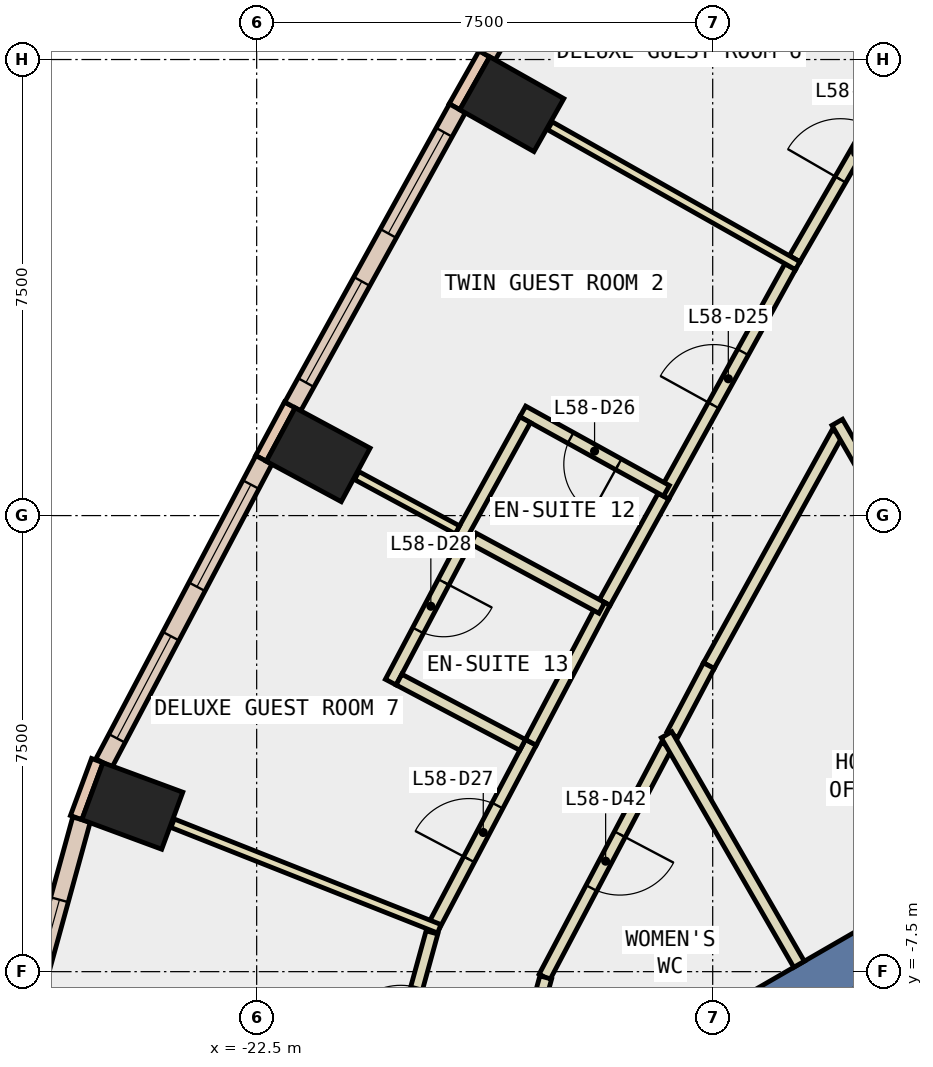
"""IFC4 building model, lengths in metres.
Left out: names, types, materials, properties, quantities, classifications, styles, units other than length and angle.
Written with IfcOpenShell. Run it as: python <this file> out.ifc"""

import sys

from ifc_helpers import new_model, si_unit, direction, frame, frame_2d, origin, origin_2d, place, context, subcontext, project, spatial, rectangle, extrude, element, fill, save


model = new_model("IFC4")
c1 = context("Model", 3, precision=1e-05, world=origin(), true_north=direction((0.0, 1.0)))
c2 = subcontext(c1, "Body", "Model", "MODEL_VIEW")
j1 = project(units=[si_unit("LENGTHUNIT", "METRE"), si_unit("PLANEANGLEUNIT", "RADIAN")], contexts=[c1])
p1 = place(None, origin())
s1 = spatial("IfcSite", under=j1, at=p1, CompositionType="ELEMENT")
p2 = place(p1, origin())
s2 = spatial("IfcBuilding", under=s1, at=p2, CompositionType="ELEMENT")
p3 = place(p2, frame((0.0, 0.0, 255.8)))
s3 = spatial("IfcBuildingStorey", under=s2, at=p3, CompositionType="ELEMENT", Elevation=255.8)
for number, where, z_axis, x_axis in (
    (1, (-18.304, 6.766, -0.34), (0.0, 0.0, 1.0), (0.491, 0.871, 0.0)),
    (2, (-21.488, 1.001, -0.34), (0.0, 0.0, 1.0), (0.474, 0.881, 0.0)),
    (3, (-24.545, -4.775, -0.34), (0.0, 0.0, 1.0), (0.347, 0.938, 0.0)),
):
    element("IfcColumn", number, at=place(p3, frame(where, z_axis=z_axis, x_axis=x_axis)), inside=s3, PredefinedType="COLUMN", context=c2, shape_type="SweptSolid", body=[
        extrude(rectangle(XDim=1.0, YDim=1.4, at=origin_2d()), origin(), (0.0, 0.0, 1.0), 3.6),
    ])
p4 = place(p3, frame((-7.578, -4.375, -0.34), z_axis=(0.0, 0.0, 1.0), x_axis=(-0.866024315419, -0.5000018851, 0.0)))
e4 = element("IfcWall", 4, at=p4, inside=s3, PredefinedType="SHEAR", context=c2, shape_type="SweptSolid", body=[
    extrude(rectangle(XDim=9.0, YDim=0.8, at=frame_2d((4.5, 0.0))), origin(), (0.0, 0.0, 1.0), 3.6),
])
for number, where, z_axis, x_axis in (
    (5, (-18.755, 7.594, 0.0), (0.0, 0.0, 1.0), (-0.492, -0.871, 0.0)),
    (6, (-21.955, 1.821, 0.0), (0.0, 0.0, 1.0), (-0.474, -0.881, 0.0)),
):
    element("IfcWall", number, at=place(p3, frame(where, z_axis=z_axis, x_axis=x_axis)), inside=s3, PredefinedType="STANDARD", context=c2, shape_type="SweptSolid", body=[
        extrude(rectangle(XDim=1.0, YDim=0.2, at=frame_2d((0.5, 0.0))), origin(), (0.0, 0.0, 1.0), 3.26),
    ])
p5 = place(p3, frame((-25.122, -4.029, 0.0), z_axis=(0.0, 0.0, 1.0), x_axis=(-0.346892928577, -0.937904737222, 0.0)))
e7 = element("IfcWall", 7, at=p5, inside=s3, PredefinedType="STANDARD", context=c2, shape_type="SweptSolid", body=[
    extrude(rectangle(XDim=1.0, YDim=0.2, at=frame_2d((0.5, 0.0))), origin(), (0.0, 0.0, 1.0), 3.26),
])
p6 = place(p3, frame((-15.906, 12.418, 0.0), z_axis=(0.0, 0.0, 1.0), x_axis=(-0.500089564757, -0.865973687372, 0.0)))
e8 = element("IfcWall", 8, at=p6, inside=s3, PredefinedType="STANDARD", context=c2, shape_type="SweptSolid", body=[
    extrude(rectangle(XDim=5.603, YDim=0.3, at=frame_2d((2.802, 0.0))), origin(), (0.0, 0.0, 1.0), 3.26),
])
p7 = place(p6, frame((0.451, 0.0, 0.9)))
e9 = element("IfcOpeningElement", 9, at=p7, cuts=e8, PredefinedType="OPENING", context=c2, shape_type="SweptSolid", body=[
    extrude(rectangle(XDim=1.9, YDim=2.0, at=frame_2d((0.95, 1.0))), frame((0.0, 0.16, 0.0), z_axis=(0.0, -1.0, 0.0), x_axis=(1.0, 0.0, 0.0)), (0.0, 0.0, 1.0), 0.32),
])
p8 = place(p6, frame((3.252, 0.0, 0.9)))
e10 = element("IfcOpeningElement", 10, at=p8, cuts=e8, PredefinedType="OPENING", context=c2, shape_type="SweptSolid", body=[
    extrude(rectangle(XDim=1.9, YDim=2.0, at=frame_2d((0.95, 1.0))), frame((0.0, 0.16, 0.0), z_axis=(0.0, -1.0, 0.0), x_axis=(1.0, 0.0, 0.0)), (0.0, 0.0, 1.0), 0.32),
])
p9 = place(p3, frame((-19.199, 6.697, 0.0), z_axis=(0.0, 0.0, 1.0), x_axis=(-0.483469062695, -0.875361448441, 0.0)))
e11 = element("IfcWall", 11, at=p9, inside=s3, PredefinedType="STANDARD", context=c2, shape_type="SweptSolid", body=[
    extrude(rectangle(XDim=5.601, YDim=0.3, at=frame_2d((2.801, 0.0))), origin(), (0.0, 0.0, 1.0), 3.26),
])
p10 = place(p9, frame((0.45, 0.0, 0.9)))
e12 = element("IfcOpeningElement", 12, at=p10, cuts=e11, PredefinedType="OPENING", context=c2, shape_type="SweptSolid", body=[
    extrude(rectangle(XDim=1.9, YDim=2.0, at=frame_2d((0.95, 1.0))), frame((0.0, 0.16, 0.0), z_axis=(0.0, -1.0, 0.0), x_axis=(1.0, 0.0, 0.0)), (0.0, 0.0, 1.0), 0.32),
])
p11 = place(p9, frame((3.251, 0.0, 0.9)))
e13 = element("IfcOpeningElement", 13, at=p11, cuts=e11, PredefinedType="OPENING", context=c2, shape_type="SweptSolid", body=[
    extrude(rectangle(XDim=1.9, YDim=2.0, at=frame_2d((0.95, 1.0))), frame((0.0, 0.16, 0.0), z_axis=(0.0, -1.0, 0.0), x_axis=(1.0, 0.0, 0.0)), (0.0, 0.0, 1.0), 0.32),
])
p12 = place(p3, frame((-22.381, 0.916, 0.0), z_axis=(0.0, 0.0, 1.0), x_axis=(-0.466663589714, -0.884434900959, 0.0)))
e14 = element("IfcWall", 14, at=p12, inside=s3, PredefinedType="STANDARD", context=c2, shape_type="SweptSolid", body=[
    extrude(rectangle(XDim=5.638, YDim=0.3, at=frame_2d((2.819, 0.0))), origin(), (0.0, 0.0, 1.0), 3.26),
])
p13 = place(p12, frame((0.459, 0.0, 0.9)))
e15 = element("IfcOpeningElement", 15, at=p13, cuts=e14, PredefinedType="OPENING", context=c2, shape_type="SweptSolid", body=[
    extrude(rectangle(XDim=1.9, YDim=2.0, at=frame_2d((0.95, 1.0))), frame((0.0, 0.16, 0.0), z_axis=(0.0, -1.0, 0.0), x_axis=(1.0, 0.0, 0.0)), (0.0, 0.0, 1.0), 0.32),
])
p14 = place(p12, frame((3.278, 0.0, 0.9)))
e16 = element("IfcOpeningElement", 16, at=p14, cuts=e14, PredefinedType="OPENING", context=c2, shape_type="SweptSolid", body=[
    extrude(rectangle(XDim=1.9, YDim=2.0, at=frame_2d((0.95, 1.0))), frame((0.0, 0.16, 0.0), z_axis=(0.0, -1.0, 0.0), x_axis=(1.0, 0.0, 0.0)), (0.0, 0.0, 1.0), 0.32),
])
p15 = place(p3, frame((-25.381, -4.998, 0.0), z_axis=(0.0, 0.0, 1.0), x_axis=(-0.264924661919, -0.964269113633, 0.0)))
e17 = element("IfcWall", 17, at=p15, inside=s3, PredefinedType="STANDARD", context=c2, shape_type="SweptSolid", body=[
    extrude(rectangle(XDim=4.137, YDim=0.3, at=frame_2d((2.068, 0.0))), origin(), (0.0, 0.0, 1.0), 3.26),
])
p16 = place(p15, frame((1.368, 0.0, 0.9)))
e18 = element("IfcOpeningElement", 18, at=p16, cuts=e17, PredefinedType="OPENING", context=c2, shape_type="SweptSolid", body=[
    extrude(rectangle(XDim=1.4, YDim=2.0, at=frame_2d((0.7, 1.0))), frame((0.0, 0.16, 0.0), z_axis=(0.0, -1.0, 0.0), x_axis=(1.0, 0.0, 0.0)), (0.0, 0.0, 1.0), 0.32),
])
p17 = place(p3, frame((-12.95, 1.36, 0.0), z_axis=(0.0, 0.0, 1.0), x_axis=(-0.483418231124, -0.875389521194, 0.0)))
e19 = element("IfcWall", 19, at=p17, inside=s3, PredefinedType="PARTITIONING", context=c2, shape_type="SweptSolid", body=[
    extrude(rectangle(XDim=4.373, YDim=0.2, at=frame_2d((2.187, 0.0))), origin(), (0.0, 0.0, 1.0), 3.26),
])
p18 = place(p3, frame((-15.064, -2.468, 0.0), z_axis=(0.0, 0.0, 1.0), x_axis=(-0.467126648849, -0.884190417238, 0.0)))
e20 = element("IfcWall", 20, at=p18, inside=s3, PredefinedType="PARTITIONING", context=c2, shape_type="SweptSolid", body=[
    extrude(rectangle(XDim=1.282, YDim=0.2, at=frame_2d((0.641, 0.0))), origin(), (0.0, 0.0, 1.0), 3.26),
])
p19 = place(p3, frame((-15.756, -3.779, 0.0), z_axis=(0.0, 0.0, 1.0), x_axis=(-0.46672043873, -0.884404902786, 0.0)))
e21 = element("IfcWall", 21, at=p19, inside=s3, PredefinedType="PARTITIONING", context=c2, shape_type="SweptSolid", body=[
    extrude(rectangle(XDim=4.307, YDim=0.2, at=frame_2d((2.153, 0.0))), origin(), (0.0, 0.0, 1.0), 3.26),
])
p20 = place(p19, frame((1.653, 0.0, 0.0)))
e22 = element("IfcOpeningElement", 22, at=p20, cuts=e21, PredefinedType="OPENING", context=c2, shape_type="SweptSolid", body=[
    extrude(rectangle(XDim=1.0, YDim=2.1, at=frame_2d((0.5, 1.05))), frame((0.0, 0.11, 0.0), z_axis=(0.0, -1.0, 0.0), x_axis=(1.0, 0.0, 0.0)), (0.0, 0.0, 1.0), 0.22),
])
p21 = place(p3, frame((-17.746, -7.596, 0.0), z_axis=(0.0, 0.0, 1.0), x_axis=(-0.264859637197, -0.96428697626, 0.0)))
e23 = element("IfcWall", 23, at=p21, inside=s3, PredefinedType="PARTITIONING", context=c2, shape_type="SweptSolid", body=[
    extrude(rectangle(XDim=2.122, YDim=0.2, at=frame_2d((1.061, 0.0))), origin(), (0.0, 0.0, 1.0), 3.26),
])
p22 = place(p3, frame((-13.652, 4.224, 0.0), z_axis=(0.0, 0.0, 1.0), x_axis=(0.500221427001, 0.865897525097, 0.0)))
e24 = element("IfcWall", 24, at=p22, inside=s3, PredefinedType="PARTITIONING", context=c2, shape_type="SweptSolid", body=[
    extrude(rectangle(XDim=3.91, YDim=0.2, at=frame_2d((1.955, 0.0))), origin(), (0.0, 0.0, 1.0), 3.26),
])
p23 = place(p22, frame((1.505, 0.0, 0.0)))
e25 = element("IfcOpeningElement", 25, at=p23, cuts=e24, PredefinedType="OPENING", context=c2, shape_type="SweptSolid", body=[
    extrude(rectangle(XDim=1.0, YDim=2.1, at=frame_2d((0.5, 1.05))), frame((0.0, 0.11, 0.0), z_axis=(0.0, -1.0, 0.0), x_axis=(1.0, 0.0, 0.0)), (0.0, 0.0, 1.0), 0.22),
])
p24 = place(p3, frame((-15.809, 0.32, 0.0), z_axis=(0.0, 0.0, 1.0), x_axis=(0.483322920175, 0.875442148193, 0.0)))
e26 = element("IfcWall", 26, at=p24, inside=s3, PredefinedType="PARTITIONING", context=c2, shape_type="SweptSolid", body=[
    extrude(rectangle(XDim=4.31, YDim=0.2, at=frame_2d((2.155, 0.0))), origin(), (0.0, 0.0, 1.0), 3.26),
])
p25 = place(p24, frame((1.705, 0.0, 0.0)))
e27 = element("IfcOpeningElement", 27, at=p25, cuts=e26, PredefinedType="OPENING", context=c2, shape_type="SweptSolid", body=[
    extrude(rectangle(XDim=1.0, YDim=2.1, at=frame_2d((0.5, 1.05))), frame((0.0, 0.11, 0.0), z_axis=(0.0, -1.0, 0.0), x_axis=(1.0, 0.0, 0.0)), (0.0, 0.0, 1.0), 0.22),
])
p26 = place(p3, frame((-16.776, -1.43, 0.0), z_axis=(0.0, 0.0, 1.0), x_axis=(0.48360724937, 0.87528511261, 0.0)))
e28 = element("IfcWall", 28, at=p26, inside=s3, PredefinedType="PARTITIONING", context=c2, shape_type="SweptSolid", body=[
    extrude(rectangle(XDim=1.997, YDim=0.2, at=frame_2d((0.999, 0.0))), origin(), (0.0, 0.0, 1.0), 3.26),
])
p27 = place(p3, frame((-19.602, -6.781, 0.0), z_axis=(0.0, 0.0, 1.0), x_axis=(0.466827780692, 0.884348247679, 0.0)))
e29 = element("IfcWall", 29, at=p27, inside=s3, PredefinedType="PARTITIONING", context=c2, shape_type="SweptSolid", body=[
    extrude(rectangle(XDim=3.451, YDim=0.2, at=frame_2d((1.726, 0.0))), origin(), (0.0, 0.0, 1.0), 3.26),
])
p28 = place(p27, frame((1.275, 0.0, 0.0)))
e30 = element("IfcOpeningElement", 30, at=p28, cuts=e29, PredefinedType="OPENING", context=c2, shape_type="SweptSolid", body=[
    extrude(rectangle(XDim=1.0, YDim=2.1, at=frame_2d((0.5, 1.05))), frame((0.0, 0.11, 0.0), z_axis=(0.0, -1.0, 0.0), x_axis=(1.0, 0.0, 0.0)), (0.0, 0.0, 1.0), 0.22),
])
p29 = place(p3, frame((-17.991, -3.729, 0.0), z_axis=(0.0, 0.0, 1.0), x_axis=(0.466450569784, 0.88454726609, 0.0)))
e31 = element("IfcWall", 31, at=p29, inside=s3, PredefinedType="PARTITIONING", context=c2, shape_type="SweptSolid", body=[
    extrude(rectangle(XDim=2.6, YDim=0.2, at=frame_2d((1.3, 0.0))), origin(), (0.0, 0.0, 1.0), 3.26),
])
p30 = place(p3, frame((-20.379, -9.629, 0.0), z_axis=(0.0, 0.0, 1.0), x_axis=(0.26487636938, 0.964282380293, 0.0)))
e32 = element("IfcWall", 32, at=p30, inside=s3, PredefinedType="PARTITIONING", context=c2, shape_type="SweptSolid", body=[
    extrude(rectangle(XDim=2.877, YDim=0.2, at=frame_2d((1.438, 0.0))), origin(), (0.0, 0.0, 1.0), 3.26),
])
p31 = place(p30, frame((0.938, 0.0, 0.0)))
e33 = element("IfcOpeningElement", 33, at=p31, cuts=e32, PredefinedType="OPENING", context=c2, shape_type="SweptSolid", body=[
    extrude(rectangle(XDim=1.0, YDim=2.1, at=frame_2d((0.5, 1.05))), frame((0.0, 0.11, 0.0), z_axis=(0.0, -1.0, 0.0), x_axis=(1.0, 0.0, 0.0)), (0.0, 0.0, 1.0), 0.22),
])
p32 = place(p3, frame((-8.582, -6.036, 0.0), z_axis=(0.0, 0.0, 1.0), x_axis=(-0.897105141673, -0.441817116897, 0.0)))
e34 = element("IfcWall", 34, at=p32, inside=s3, PredefinedType="PARTITIONING", context=c2, shape_type="SweptSolid", body=[
    extrude(rectangle(XDim=5.111, YDim=0.2, at=frame_2d((2.555, 0.0))), origin(), (0.0, 0.0, 1.0), 3.26),
])
p33 = place(p3, frame((-13.58, -7.379, 0.0), z_axis=(0.0, 0.0, 1.0), x_axis=(-0.499916403993, 0.866073662582, 0.0)))
e35 = element("IfcWall", 35, at=p33, inside=s3, PredefinedType="PARTITIONING", context=c2, shape_type="SweptSolid", body=[
    extrude(rectangle(XDim=4.359, YDim=0.2, at=frame_2d((2.179, 0.0))), origin(), (0.0, 0.0, 1.0), 3.26),
])
p34 = place(p3, frame((-13.825, 8.723, 0.0), z_axis=(0.0, 0.0, 1.0), x_axis=(0.866053019151, -0.499952165731, 0.0)))
e36 = element("IfcWall", 36, at=p34, inside=s3, PredefinedType="PARTITIONING", context=c2, shape_type="SweptSolid", body=[
    extrude(rectangle(XDim=2.3, YDim=0.2, at=frame_2d((1.15, 0.0))), origin(), (0.0, 0.0, 1.0), 3.26),
])
p35 = place(p3, frame((-13.602, 4.11, 0.0), z_axis=(0.0, 0.0, 1.0), x_axis=(-0.870787203306, 0.491660092502, 0.0)))
e37 = element("IfcWall", 37, at=p35, inside=s3, PredefinedType="PARTITIONING", context=c2, shape_type="SweptSolid", body=[
    extrude(rectangle(XDim=4.68, YDim=0.15, at=frame_2d((2.34, 0.0))), origin(), (0.0, 0.0, 1.0), 3.26),
])
p36 = place(p3, frame((-15.761, 0.408, 0.0), z_axis=(0.0, 0.0, 1.0), x_axis=(-0.875391622802, 0.483414425445, 0.0)))
e38 = element("IfcWall", 38, at=p36, inside=s3, PredefinedType="PARTITIONING", context=c2, shape_type="SweptSolid", body=[
    extrude(rectangle(XDim=2.699, YDim=0.2, at=frame_2d((1.35, 0.0))), origin(), (0.0, 0.0, 1.0), 3.26),
])
p37 = place(p36, frame((0.9, 0.0, 0.0)))
e39 = element("IfcOpeningElement", 39, at=p37, cuts=e38, PredefinedType="OPENING", context=c2, shape_type="SweptSolid", body=[
    extrude(rectangle(XDim=0.9, YDim=2.1, at=frame_2d((0.45, 1.05))), frame((0.0, 0.11, 0.0), z_axis=(0.0, -1.0, 0.0), x_axis=(1.0, 0.0, 0.0)), (0.0, 0.0, 1.0), 0.22),
])
p38 = place(p3, frame((-18.085, 1.577, 0.0), z_axis=(0.0, 0.0, 1.0), x_axis=(-0.483329790342, -0.875438355207, 0.0)))
e40 = element("IfcWall", 40, at=p38, inside=s3, PredefinedType="PARTITIONING", context=c2, shape_type="SweptSolid", body=[
    extrude(rectangle(XDim=2.224, YDim=0.2, at=frame_2d((1.112, 0.0))), origin(), (0.0, 0.0, 1.0), 3.26),
])
p39 = place(p3, frame((-19.199, -0.235, 0.0), z_axis=(0.0, 0.0, 1.0), x_axis=(-0.880166754904, 0.474664601126, 0.0)))
e41 = element("IfcWall", 41, at=p39, inside=s3, PredefinedType="PARTITIONING", context=c2, shape_type="SweptSolid", body=[
    extrude(rectangle(XDim=1.881, YDim=0.15, at=frame_2d((0.941, 0.0))), origin(), (0.0, 0.0, 1.0), 3.26),
])
p40 = place(p3, frame((-16.824, -1.518, 0.0), z_axis=(0.0, 0.0, 1.0), x_axis=(-0.879879019938, 0.47519775912, 0.0)))
e42 = element("IfcWall", 42, at=p40, inside=s3, PredefinedType="PARTITIONING", context=c2, shape_type="SweptSolid", body=[
    extrude(rectangle(XDim=2.399, YDim=0.2, at=frame_2d((1.2, 0.0))), origin(), (0.0, 0.0, 1.0), 3.26),
])
p41 = place(p3, frame((-19.069, -0.418, 0.0), z_axis=(0.0, 0.0, 1.0), x_axis=(-0.467007153784, -0.884253537349, 0.0)))
e43 = element("IfcWall", 43, at=p41, inside=s3, PredefinedType="PARTITIONING", context=c2, shape_type="SweptSolid", body=[
    extrude(rectangle(XDim=2.625, YDim=0.2, at=frame_2d((1.312, 0.0))), origin(), (0.0, 0.0, 1.0), 3.26),
])
p42 = place(p41, frame((0.763, 0.0, 0.0)))
e44 = element("IfcOpeningElement", 44, at=p42, cuts=e43, PredefinedType="OPENING", context=c2, shape_type="SweptSolid", body=[
    extrude(rectangle(XDim=0.9, YDim=2.1, at=frame_2d((0.45, 1.05))), frame((0.0, 0.11, 0.0), z_axis=(0.0, -1.0, 0.0), x_axis=(1.0, 0.0, 0.0)), (0.0, 0.0, 1.0), 0.22),
])
p43 = place(p3, frame((-20.16, -2.697, 0.0), z_axis=(0.0, 0.0, 1.0), x_axis=(0.884293452572, -0.466931568583, 0.0)))
e45 = element("IfcWall", 45, at=p43, inside=s3, PredefinedType="PARTITIONING", context=c2, shape_type="SweptSolid", body=[
    extrude(rectangle(XDim=2.3, YDim=0.2, at=frame_2d((1.15, 0.0))), origin(), (0.0, 0.0, 1.0), 3.26),
])
p44 = place(p3, frame((-19.497, -6.795, 0.0), z_axis=(0.0, 0.0, 1.0), x_axis=(-0.929826906887, 0.367997178289, 0.0)))
e46 = element("IfcWall", 46, at=p44, inside=s3, PredefinedType="PARTITIONING", context=c2, shape_type="SweptSolid", body=[
    extrude(rectangle(XDim=4.717, YDim=0.15, at=frame_2d((2.358, 0.0))), origin(), (0.0, 0.0, 1.0), 3.26),
])
p45 = place(p3, frame((-9.25, -4.879, 0.0), z_axis=(0.0, 0.0, 1.0), x_axis=(-0.499944124422, 0.866057661161, 0.0)))
e47 = element("IfcWall", 47, at=p45, inside=s3, PredefinedType="PARTITIONING", context=c2, shape_type="SweptSolid", body=[
    extrude(rectangle(XDim=7.405, YDim=0.2, at=frame_2d((3.702, 0.0))), origin(), (0.0, 0.0, 1.0), 3.26),
])
p46 = place(p45, frame((2.533, 0.0, 0.0)))
e48 = element("IfcOpeningElement", 48, at=p46, cuts=e47, PredefinedType="OPENING", context=c2, shape_type="SweptSolid", body=[
    extrude(rectangle(XDim=0.9, YDim=2.1, at=frame_2d((0.45, 1.05))), frame((0.0, 0.11, 0.0), z_axis=(0.0, -1.0, 0.0), x_axis=(1.0, 0.0, 0.0)), (0.0, 0.0, 1.0), 0.22),
])
p47 = place(p10, origin())
e49 = element("IfcWindow", 49, at=p47, inside=s3, PartitioningType="SINGLE_PANEL", PredefinedType="WINDOW", context=c2, shape_type="SweptSolid", body=[
    extrude(rectangle(XDim=1.9, YDim=2.0, at=frame_2d((0.95, 1.0))), frame((0.0, 0.03, 0.0), z_axis=(0.0, -1.0, 0.0), x_axis=(1.0, 0.0, 0.0)), (0.0, 0.0, 1.0), 0.06),
])
fill(e12, e49)
p48 = place(p11, origin())
e50 = element("IfcWindow", 50, at=p48, inside=s3, PartitioningType="SINGLE_PANEL", PredefinedType="WINDOW", context=c2, shape_type="SweptSolid", body=[
    extrude(rectangle(XDim=1.9, YDim=2.0, at=frame_2d((0.95, 1.0))), frame((0.0, 0.03, 0.0), z_axis=(0.0, -1.0, 0.0), x_axis=(1.0, 0.0, 0.0)), (0.0, 0.0, 1.0), 0.06),
])
fill(e13, e50)
p49 = place(p13, origin())
e51 = element("IfcWindow", 51, at=p49, inside=s3, PartitioningType="SINGLE_PANEL", PredefinedType="WINDOW", context=c2, shape_type="SweptSolid", body=[
    extrude(rectangle(XDim=1.9, YDim=2.0, at=frame_2d((0.95, 1.0))), frame((0.0, 0.03, 0.0), z_axis=(0.0, -1.0, 0.0), x_axis=(1.0, 0.0, 0.0)), (0.0, 0.0, 1.0), 0.06),
])
fill(e15, e51)
p50 = place(p14, origin())
e52 = element("IfcWindow", 52, at=p50, inside=s3, PartitioningType="SINGLE_PANEL", PredefinedType="WINDOW", context=c2, shape_type="SweptSolid", body=[
    extrude(rectangle(XDim=1.9, YDim=2.0, at=frame_2d((0.95, 1.0))), frame((0.0, 0.03, 0.0), z_axis=(0.0, -1.0, 0.0), x_axis=(1.0, 0.0, 0.0)), (0.0, 0.0, 1.0), 0.06),
])
fill(e16, e52)
p51 = place(p16, origin())
e53 = element("IfcWindow", 53, at=p51, inside=s3, PartitioningType="SINGLE_PANEL", PredefinedType="WINDOW", context=c2, shape_type="SweptSolid", body=[
    extrude(rectangle(XDim=1.4, YDim=2.0, at=frame_2d((0.7, 1.0))), frame((0.0, 0.03, 0.0), z_axis=(0.0, -1.0, 0.0), x_axis=(1.0, 0.0, 0.0)), (0.0, 0.0, 1.0), 0.06),
])
fill(e18, e53)
p52 = place(p23, origin())
e54 = element("IfcDoor", 54, at=p52, inside=s3, OperationType="SINGLE_SWING_RIGHT", PredefinedType="DOOR", context=c2, shape_type="SweptSolid", body=[
    extrude(rectangle(XDim=1.0, YDim=2.1, at=frame_2d((0.5, 1.05))), frame((0.0, 0.025, 0.0), z_axis=(0.0, -1.0, 0.0), x_axis=(1.0, 0.0, 0.0)), (0.0, 0.0, 1.0), 0.05),
])
fill(e25, e54)
p53 = place(p25, origin())
e55 = element("IfcDoor", 55, at=p53, inside=s3, OperationType="SINGLE_SWING_RIGHT", PredefinedType="DOOR", context=c2, shape_type="SweptSolid", body=[
    extrude(rectangle(XDim=1.0, YDim=2.1, at=frame_2d((0.5, 1.05))), frame((0.0, 0.025, 0.0), z_axis=(0.0, -1.0, 0.0), x_axis=(1.0, 0.0, 0.0)), (0.0, 0.0, 1.0), 0.05),
])
fill(e27, e55)
p54 = place(p37, origin())
e56 = element("IfcDoor", 56, at=p54, inside=s3, OperationType="SINGLE_SWING_LEFT", PredefinedType="DOOR", context=c2, shape_type="SweptSolid", body=[
    extrude(rectangle(XDim=0.9, YDim=2.1, at=frame_2d((0.45, 1.05))), frame((0.0, 0.025, 0.0), z_axis=(0.0, -1.0, 0.0), x_axis=(1.0, 0.0, 0.0)), (0.0, 0.0, 1.0), 0.05),
])
fill(e39, e56)
p55 = place(p28, origin())
e57 = element("IfcDoor", 57, at=p55, inside=s3, OperationType="SINGLE_SWING_LEFT", PredefinedType="DOOR", context=c2, shape_type="SweptSolid", body=[
    extrude(rectangle(XDim=1.0, YDim=2.1, at=frame_2d((0.5, 1.05))), frame((0.0, 0.025, 0.0), z_axis=(0.0, -1.0, 0.0), x_axis=(1.0, 0.0, 0.0)), (0.0, 0.0, 1.0), 0.05),
])
fill(e30, e57)
p56 = place(p42, origin())
e58 = element("IfcDoor", 58, at=p56, inside=s3, OperationType="SINGLE_SWING_LEFT", PredefinedType="DOOR", context=c2, shape_type="SweptSolid", body=[
    extrude(rectangle(XDim=0.9, YDim=2.1, at=frame_2d((0.45, 1.05))), frame((0.0, 0.025, 0.0), z_axis=(0.0, -1.0, 0.0), x_axis=(1.0, 0.0, 0.0)), (0.0, 0.0, 1.0), 0.05),
])
fill(e44, e58)
p57 = place(p31, origin())
e59 = element("IfcDoor", 59, at=p57, inside=s3, OperationType="SINGLE_SWING_LEFT", PredefinedType="DOOR", context=c2, shape_type="SweptSolid", body=[
    extrude(rectangle(XDim=1.0, YDim=2.1, at=frame_2d((0.5, 1.05))), frame((0.0, 0.025, 0.0), z_axis=(0.0, -1.0, 0.0), x_axis=(1.0, 0.0, 0.0)), (0.0, 0.0, 1.0), 0.05),
])
fill(e33, e59)
p58 = place(p20, origin())
e60 = element("IfcDoor", 60, at=p58, inside=s3, OperationType="SINGLE_SWING_LEFT", PredefinedType="DOOR", context=c2, shape_type="SweptSolid", body=[
    extrude(rectangle(XDim=1.0, YDim=2.1, at=frame_2d((0.5, 1.05))), frame((0.0, 0.025, 0.0), z_axis=(0.0, -1.0, 0.0), x_axis=(1.0, 0.0, 0.0)), (0.0, 0.0, 1.0), 0.05),
])
fill(e22, e60)
save(model, sys.argv[1])
